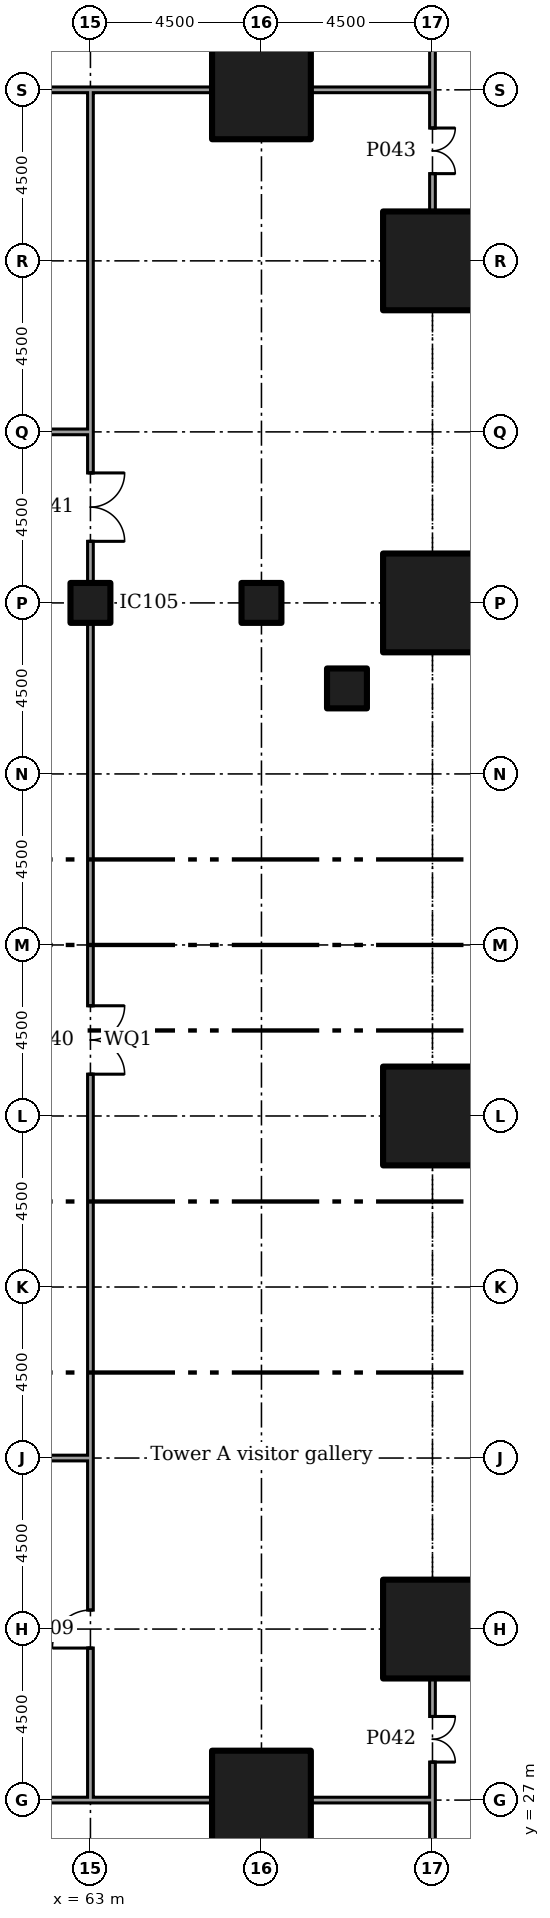
"""IFC4 building model, lengths in metres.
Left out: names, types, materials, properties, quantities, classifications, styles, units other than length and angle.
Written with IfcOpenShell. Run it as: python <this file> out.ifc"""

import sys

from ifc_helpers import new_model, si_unit, direction, frame, frame_2d, origin, origin_2d, place, context, subcontext, project, spatial, rectangle, extrude, element, fill, save


model = new_model("IFC4")
c1 = context("Model", 3, precision=1e-05, world=origin(), true_north=direction((0.0, 1.0)))
c2 = subcontext(c1, "Body", "Model", "MODEL_VIEW")
j1 = project(units=[si_unit("LENGTHUNIT", "METRE"), si_unit("PLANEANGLEUNIT", "RADIAN")], contexts=[c1])
p1 = place(None, origin())
s1 = spatial("IfcSite", under=j1, at=p1, CompositionType="ELEMENT")
p2 = place(p1, origin())
s2 = spatial("IfcBuilding", under=s1, at=p2, CompositionType="ELEMENT")
p3 = place(p2, frame((0.0, 0.0, 11.5)))
s3 = spatial("IfcBuildingStorey", under=s2, at=p3, CompositionType="ELEMENT", Elevation=11.5)
for number, where in (
    (1, (67.5, 27.0, 0.0)),
    (2, (67.5, 72.0, 0.0)),
    (3, (72.0, 31.5, 0.0)),
    (4, (72.0, 45.0, 0.0)),
    (5, (72.0, 58.5, 0.0)),
    (6, (72.0, 67.5, 0.0)),
):
    element("IfcColumn", number, at=place(p3, frame(where)), inside=s3, PredefinedType="COLUMN", context=c2, shape_type="SweptSolid", body=[
        extrude(rectangle(XDim=2.6, YDim=2.6, at=origin_2d()), origin(), (0.0, 0.0, 1.0), 5.0),
    ])
for number, where in (
    (7, (63.0, 58.5, 0.0)),
    (8, (67.5, 58.5, 0.0)),
    (9, (69.75, 56.25, 0.0)),
):
    element("IfcColumn", number, at=place(p3, frame(where)), inside=s3, PredefinedType="COLUMN", context=c2, shape_type="SweptSolid", body=[
        extrude(rectangle(XDim=1.05, YDim=1.05, at=origin_2d()), origin(), (0.0, 0.0, 1.0), 5.0),
    ])
p4 = place(p2, frame((0.0, 0.0, 6.0)))
s4 = spatial("IfcBuildingStorey", under=s2, at=p4, CompositionType="ELEMENT", Elevation=6.0)
p5 = place(p4, frame((72.0, 32.795, 0.0), z_axis=(0.0, 0.0, 1.0), x_axis=(0.0, 1.0, 0.0)))
e10 = element("IfcWall", 10, at=p5, inside=s4, PredefinedType="SOLIDWALL", context=c2, shape_type="SweptSolid", body=[
    extrude(rectangle(XDim=10.91, YDim=0.3, at=frame_2d((5.455, 0.0))), origin(), (0.0, 0.0, 1.0), 10.05),
])
p6 = place(p5, frame((4.55, 0.0, 0.0)))
e11 = element("IfcOpeningElement", 11, at=p6, cuts=e10, PredefinedType="OPENING", context=c2, shape_type="SweptSolid", body=[
    extrude(rectangle(XDim=1.8, YDim=2.1, at=frame_2d((0.9, 1.05))), frame((0.0, 0.16, 0.0), z_axis=(0.0, -1.0, 0.0), x_axis=(1.0, 0.0, 0.0)), (0.0, 0.0, 1.0), 0.32),
])
p7 = place(p4, frame((72.0, 46.295, 0.0), z_axis=(0.0, 0.0, 1.0), x_axis=(0.0, 1.0, 0.0)))
e12 = element("IfcWall", 12, at=p7, inside=s4, PredefinedType="SOLIDWALL", context=c2, shape_type="SweptSolid", body=[
    extrude(rectangle(XDim=10.91, YDim=0.3, at=frame_2d((5.455, 0.0))), origin(), (0.0, 0.0, 1.0), 10.05),
])
p8 = place(p7, frame((4.55, 0.0, 0.0)))
e13 = element("IfcOpeningElement", 13, at=p8, cuts=e12, PredefinedType="OPENING", context=c2, shape_type="SweptSolid", body=[
    extrude(rectangle(XDim=1.8, YDim=2.1, at=frame_2d((0.9, 1.05))), frame((0.0, 0.16, 0.0), z_axis=(0.0, -1.0, 0.0), x_axis=(1.0, 0.0, 0.0)), (0.0, 0.0, 1.0), 0.32),
])
p9 = place(p4, frame((72.0, 59.795, 0.0), z_axis=(0.0, 0.0, 1.0), x_axis=(0.0, 1.0, 0.0)))
e14 = element("IfcWall", 14, at=p9, inside=s4, PredefinedType="SOLIDWALL", context=c2, shape_type="SweptSolid", body=[
    extrude(rectangle(XDim=6.41, YDim=0.3, at=frame_2d((3.205, 0.0))), origin(), (0.0, 0.0, 1.0), 10.05),
])
for number, where in (
    (15, (62.925, 27.0, 0.0)),
    (16, (68.795, 27.0, 0.0)),
):
    element("IfcWall", number, at=place(p3, frame(where)), inside=s3, PredefinedType="PARTITIONING", context=c2, shape_type="SweptSolid", body=[
        extrude(rectangle(XDim=3.28, YDim=0.15, at=frame_2d((1.64, 0.0))), origin(), (0.0, 0.0, 1.0), 4.55),
    ])
p10 = place(p3, frame((59.795, 27.0, 0.0)))
e17 = element("IfcWall", 17, at=p10, inside=s3, PredefinedType="PARTITIONING", context=c2, shape_type="SweptSolid", body=[
    extrude(rectangle(XDim=3.205, YDim=0.15, at=frame_2d((1.603, 0.0))), origin(), (0.0, 0.0, 1.0), 4.55),
])
p11 = place(p3, frame((72.0, 22.575, 0.0), z_axis=(0.0, 0.0, 1.0), x_axis=(0.0, 1.0, 0.0)))
e18 = element("IfcWall", 18, at=p11, inside=s3, PredefinedType="PARTITIONING", context=c2, shape_type="SweptSolid", body=[
    extrude(rectangle(XDim=4.35, YDim=0.15, at=frame_2d((2.175, 0.0))), origin(), (0.0, 0.0, 1.0), 4.55),
])
for number, where in (
    (19, (62.925, 72.0, 0.0)),
    (20, (68.795, 72.0, 0.0)),
):
    element("IfcWall", number, at=place(p3, frame(where)), inside=s3, PredefinedType="PARTITIONING", context=c2, shape_type="SweptSolid", body=[
        extrude(rectangle(XDim=3.28, YDim=0.15, at=frame_2d((1.64, 0.0))), origin(), (0.0, 0.0, 1.0), 4.55),
    ])
p12 = place(p3, frame((59.795, 72.0, 0.0)))
e21 = element("IfcWall", 21, at=p12, inside=s3, PredefinedType="PARTITIONING", context=c2, shape_type="SweptSolid", body=[
    extrude(rectangle(XDim=3.205, YDim=0.15, at=frame_2d((1.603, 0.0))), origin(), (0.0, 0.0, 1.0), 4.55),
])
p13 = place(p3, frame((72.0, 72.0, 0.0), z_axis=(0.0, 0.0, 1.0), x_axis=(0.0, 1.0, 0.0)))
e22 = element("IfcWall", 22, at=p13, inside=s3, PredefinedType="PARTITIONING", context=c2, shape_type="SweptSolid", body=[
    extrude(rectangle(XDim=4.425, YDim=0.15, at=frame_2d((2.212, 0.0))), origin(), (0.0, 0.0, 1.0), 4.55),
])
p14 = place(p3, frame((63.0, 27.075, 0.0), z_axis=(0.0, 0.0, 1.0), x_axis=(0.0, 1.0, 0.0)))
e23 = element("IfcWall", 23, at=p14, inside=s3, PredefinedType="PARTITIONING", context=c2, shape_type="SweptSolid", body=[
    extrude(rectangle(XDim=9.0, YDim=0.15, at=frame_2d((4.5, 0.0))), origin(), (0.0, 0.0, 1.0), 4.55),
])
p15 = place(p14, frame((3.925, 0.0, 0.0)))
e24 = element("IfcOpeningElement", 24, at=p15, cuts=e23, PredefinedType="OPENING", context=c2, shape_type="SweptSolid", body=[
    extrude(rectangle(XDim=1.0, YDim=2.1, at=frame_2d((0.5, 1.05))), frame((0.0, 0.085, 0.0), z_axis=(0.0, -1.0, 0.0), x_axis=(1.0, 0.0, 0.0)), (0.0, 0.0, 1.0), 0.17),
])
p16 = place(p3, frame((63.0, 62.925, 0.0), z_axis=(0.0, 0.0, 1.0), x_axis=(0.0, 1.0, 0.0)))
e25 = element("IfcWall", 25, at=p16, inside=s3, PredefinedType="PARTITIONING", context=c2, shape_type="SweptSolid", body=[
    extrude(rectangle(XDim=9.0, YDim=0.15, at=frame_2d((4.5, 0.0))), origin(), (0.0, 0.0, 1.0), 4.55),
])
p17 = place(p3, frame((63.0, 36.0, 0.0), z_axis=(0.0, 0.0, 1.0), x_axis=(0.0, 1.0, 0.0)))
e26 = element("IfcWall", 26, at=p17, inside=s3, PredefinedType="PARTITIONING", context=c2, shape_type="SweptSolid", body=[
    extrude(rectangle(XDim=21.98, YDim=0.15, at=frame_2d((10.99, 0.0))), origin(), (0.0, 0.0, 1.0), 4.55),
])
p18 = place(p17, frame((10.1, 0.0, 0.0)))
e27 = element("IfcOpeningElement", 27, at=p18, cuts=e26, PredefinedType="OPENING", context=c2, shape_type="SweptSolid", body=[
    extrude(rectangle(XDim=1.8, YDim=2.1, at=frame_2d((0.9, 1.05))), frame((0.0, 0.085, 0.0), z_axis=(0.0, -1.0, 0.0), x_axis=(1.0, 0.0, 0.0)), (0.0, 0.0, 1.0), 0.17),
])
p19 = place(p3, frame((63.0, 59.02, 0.0), z_axis=(0.0, 0.0, 1.0), x_axis=(0.0, 1.0, 0.0)))
e28 = element("IfcWall", 28, at=p19, inside=s3, PredefinedType="PARTITIONING", context=c2, shape_type="SweptSolid", body=[
    extrude(rectangle(XDim=3.98, YDim=0.15, at=frame_2d((1.99, 0.0))), origin(), (0.0, 0.0, 1.0), 4.55),
])
p20 = place(p19, frame((1.1, 0.0, 0.0)))
e29 = element("IfcOpeningElement", 29, at=p20, cuts=e28, PredefinedType="OPENING", context=c2, shape_type="SweptSolid", body=[
    extrude(rectangle(XDim=1.8, YDim=2.1, at=frame_2d((0.9, 1.05))), frame((0.0, 0.085, 0.0), z_axis=(0.0, -1.0, 0.0), x_axis=(1.0, 0.0, 0.0)), (0.0, 0.0, 1.0), 0.17),
])
p21 = place(p3, frame((72.0, 27.0, 0.0), z_axis=(0.0, 0.0, 1.0), x_axis=(0.0, 1.0, 0.0)))
e30 = element("IfcWall", 30, at=p21, inside=s3, PredefinedType="PARTITIONING", context=c2, shape_type="SweptSolid", body=[
    extrude(rectangle(XDim=3.205, YDim=0.15, at=frame_2d((1.603, 0.0))), origin(), (0.0, 0.0, 1.0), 4.55),
])
p22 = place(p21, frame((1.0, 0.0, 0.0)))
e31 = element("IfcOpeningElement", 31, at=p22, cuts=e30, PredefinedType="OPENING", context=c2, shape_type="SweptSolid", body=[
    extrude(rectangle(XDim=1.2, YDim=2.1, at=frame_2d((0.6, 1.05))), frame((0.0, 0.085, 0.0), z_axis=(0.0, -1.0, 0.0), x_axis=(1.0, 0.0, 0.0)), (0.0, 0.0, 1.0), 0.17),
])
p23 = place(p3, frame((72.0, 68.795, 0.0), z_axis=(0.0, 0.0, 1.0), x_axis=(0.0, 1.0, 0.0)))
e32 = element("IfcWall", 32, at=p23, inside=s3, PredefinedType="PARTITIONING", context=c2, shape_type="SweptSolid", body=[
    extrude(rectangle(XDim=3.13, YDim=0.15, at=frame_2d((1.565, 0.0))), origin(), (0.0, 0.0, 1.0), 4.55),
])
p24 = place(p23, frame((1.0, 0.0, 0.0)))
e33 = element("IfcOpeningElement", 33, at=p24, cuts=e32, PredefinedType="OPENING", context=c2, shape_type="SweptSolid", body=[
    extrude(rectangle(XDim=1.2, YDim=2.1, at=frame_2d((0.6, 1.05))), frame((0.0, 0.085, 0.0), z_axis=(0.0, -1.0, 0.0), x_axis=(1.0, 0.0, 0.0)), (0.0, 0.0, 1.0), 0.17),
])
p25 = place(p3, frame((59.02, 36.0, 0.0)))
e34 = element("IfcWall", 34, at=p25, inside=s3, PredefinedType="PARTITIONING", context=c2, shape_type="SweptSolid", body=[
    extrude(rectangle(XDim=3.905, YDim=0.15, at=frame_2d((1.953, 0.0))), origin(), (0.0, 0.0, 1.0), 4.55),
])
p26 = place(p3, frame((41.02, 63.0, 0.0)))
e35 = element("IfcWall", 35, at=p26, inside=s3, PredefinedType="PARTITIONING", context=c2, shape_type="SweptSolid", body=[
    extrude(rectangle(XDim=21.905, YDim=0.15, at=frame_2d((10.953, 0.0))), origin(), (0.0, 0.0, 1.0), 4.55),
])
p27 = place(p26, frame((10.5, 0.0, 0.0)))
e36 = element("IfcOpeningElement", 36, at=p27, cuts=e35, PredefinedType="OPENING", context=c2, shape_type="SweptSolid", body=[
    extrude(rectangle(XDim=1.0, YDim=2.1, at=frame_2d((0.5, 1.05))), frame((0.0, 0.085, 0.0), z_axis=(0.0, -1.0, 0.0), x_axis=(1.0, 0.0, 0.0)), (0.0, 0.0, 1.0), 0.17),
])
p28 = place(p15, origin())
e37 = element("IfcDoor", 37, at=p28, inside=s3, OperationType="SINGLE_SWING_RIGHT", PredefinedType="DOOR", context=c2, shape_type="SweptSolid", body=[
    extrude(rectangle(XDim=1.0, YDim=2.1, at=frame_2d((0.5, 1.05))), frame((0.0, 0.025, 0.0), z_axis=(0.0, -1.0, 0.0), x_axis=(1.0, 0.0, 0.0)), (0.0, 0.0, 1.0), 0.05),
])
fill(e24, e37)
p29 = place(p18, frame((1.8, 0.0, 0.0), x_axis=(-1.0, 0.0, 0.0)))
e38 = element("IfcDoor", 38, at=p29, inside=s3, OperationType="DOUBLE_DOOR_SINGLE_SWING", PredefinedType="DOOR", context=c2, shape_type="SweptSolid", body=[
    extrude(rectangle(XDim=1.8, YDim=2.1, at=frame_2d((0.9, 1.05))), frame((0.0, 0.025, 0.0), z_axis=(0.0, -1.0, 0.0), x_axis=(1.0, 0.0, 0.0)), (0.0, 0.0, 1.0), 0.05),
])
fill(e27, e38)
p30 = place(p20, frame((1.8, 0.0, 0.0), x_axis=(-1.0, 0.0, 0.0)))
e39 = element("IfcDoor", 39, at=p30, inside=s3, OperationType="DOUBLE_DOOR_SINGLE_SWING", PredefinedType="DOOR", context=c2, shape_type="SweptSolid", body=[
    extrude(rectangle(XDim=1.8, YDim=2.1, at=frame_2d((0.9, 1.05))), frame((0.0, 0.025, 0.0), z_axis=(0.0, -1.0, 0.0), x_axis=(1.0, 0.0, 0.0)), (0.0, 0.0, 1.0), 0.05),
])
fill(e29, e39)
p31 = place(p22, frame((1.2, 0.0, 0.0), x_axis=(-1.0, 0.0, 0.0)))
e40 = element("IfcDoor", 40, at=p31, inside=s3, OperationType="DOUBLE_DOOR_SINGLE_SWING", PredefinedType="DOOR", context=c2, shape_type="SweptSolid", body=[
    extrude(rectangle(XDim=1.2, YDim=2.1, at=frame_2d((0.6, 1.05))), frame((0.0, 0.025, 0.0), z_axis=(0.0, -1.0, 0.0), x_axis=(1.0, 0.0, 0.0)), (0.0, 0.0, 1.0), 0.05),
])
fill(e31, e40)
p32 = place(p24, frame((1.2, 0.0, 0.0), x_axis=(-1.0, 0.0, 0.0)))
e41 = element("IfcDoor", 41, at=p32, inside=s3, OperationType="DOUBLE_DOOR_SINGLE_SWING", PredefinedType="DOOR", context=c2, shape_type="SweptSolid", body=[
    extrude(rectangle(XDim=1.2, YDim=2.1, at=frame_2d((0.6, 1.05))), frame((0.0, 0.025, 0.0), z_axis=(0.0, -1.0, 0.0), x_axis=(1.0, 0.0, 0.0)), (0.0, 0.0, 1.0), 0.05),
])
fill(e33, e41)
save(model, sys.argv[1])
